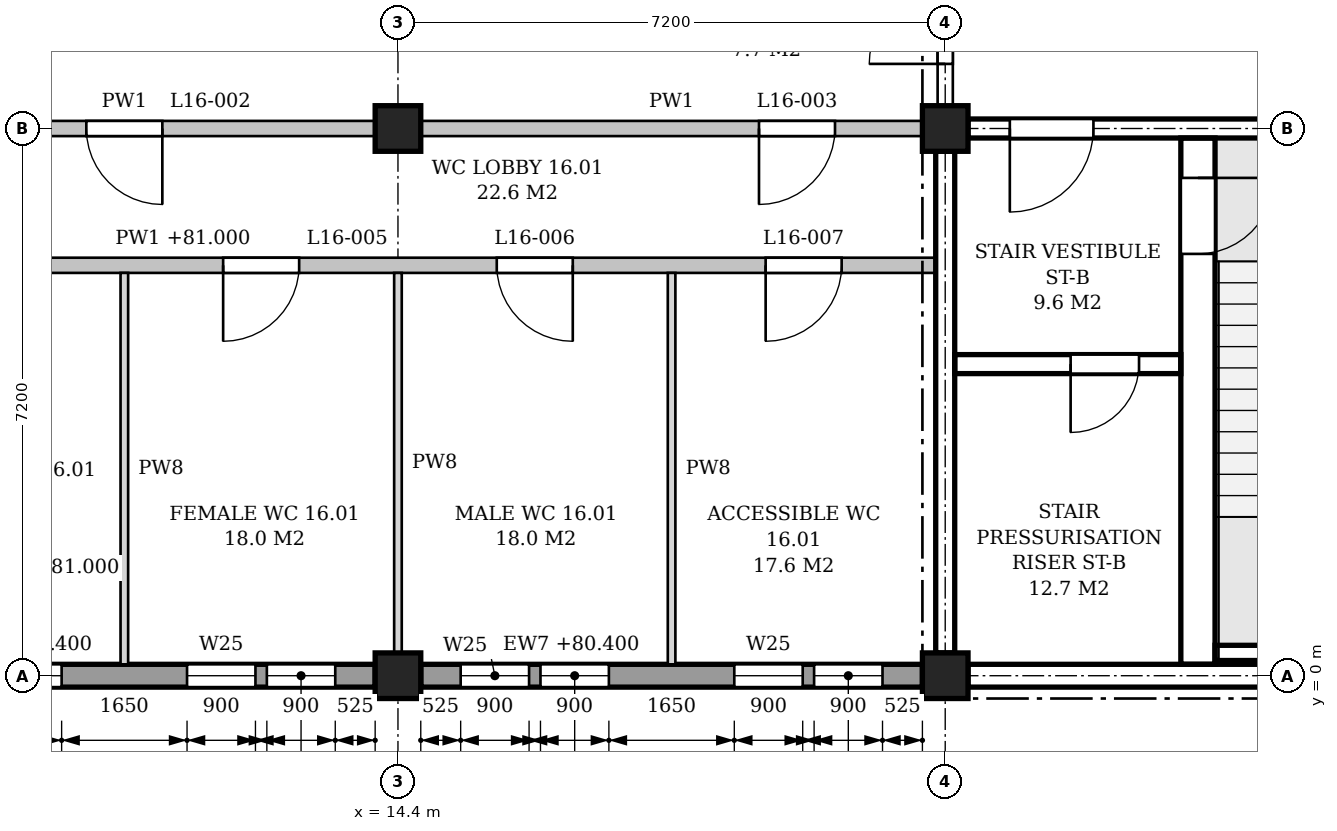
"""IFC4 building model, lengths in metres.
Left out: names, types, materials, properties, quantities, classifications, styles, units other than length and angle.
Written with IfcOpenShell. Run it as: python <this file> out.ifc"""

import sys

from ifc_helpers import new_model, si_unit, direction, frame, frame_2d, origin, origin_2d, place, context, subcontext, project, spatial, polyline, rectangle, outline, extrude, element, fill, save


model = new_model("IFC4")
c1 = context("Model", 3, precision=1e-05, world=origin(), true_north=direction((0.0, 1.0)))
c2 = subcontext(c1, "Body", "Model", "MODEL_VIEW")
j1 = project(units=[si_unit("LENGTHUNIT", "METRE"), si_unit("PLANEANGLEUNIT", "RADIAN")], contexts=[c1])
p1 = place(None, origin())
s1 = spatial("IfcSite", under=j1, at=p1, CompositionType="ELEMENT")
p2 = place(p1, origin())
s2 = spatial("IfcBuilding", under=s1, at=p2, CompositionType="ELEMENT")
p3 = place(p2, frame((0.0, 0.0, 76.8)))
s3 = spatial("IfcBuildingStorey", under=s2, at=p3, CompositionType="ELEMENT", Elevation=76.8)
for number, where, z_axis, x_axis in (
    (1, (14.4, 0.0, 0.0), (0.0, 0.0, 1.0), (1.0, 0.0, 0.0)),
    (2, (14.4, 7.2, 0.0), (0.0, 0.0, 1.0), (1.0, 0.0, 0.0)),
    (3, (21.6, 0.0, 0.0), (0.0, 0.0, 1.0), (1.0, 0.0, 0.0)),
    (4, (21.6, 7.2, 0.0), (0.0, 0.0, 1.0), (1.0, 0.0, 0.0)),
):
    element("IfcColumn", number, at=place(p3, frame(where, z_axis=z_axis, x_axis=x_axis)), inside=s3, PredefinedType="COLUMN", context=c2, shape_type="SweptSolid", body=[
        extrude(rectangle(XDim=0.6, YDim=0.6, at=origin_2d()), origin(), (0.0, 0.0, 1.0), 4.5),
    ])
p4 = place(p3, frame((7.5, 0.0, 0.0), z_axis=(0.0, 0.0, 1.0), x_axis=(1.0, 0.0, 0.0)))
e5 = element("IfcWall", 5, at=p4, inside=s3, PredefinedType="STANDARD", context=c2, shape_type="SweptSolid", body=[
    extrude(rectangle(XDim=6.6, YDim=0.3, at=frame_2d((3.3, 0.0))), origin(), (0.0, 0.0, 1.0), 3.6),
])
p5 = place(p4, frame((0.525, 0.0, 0.9)))
e6 = element("IfcOpeningElement", 6, at=p5, cuts=e5, PredefinedType="OPENING", context=c2, shape_type="SweptSolid", body=[
    extrude(outline(polyline([(0.0, 0.0), (0.9, 0.0), (0.9, 2.15), (0.45, 2.6), (0.0, 2.15), (0.0, 0.0)])), frame((0.0, 0.16, 0.0), z_axis=(0.0, -1.0, 0.0), x_axis=(1.0, 0.0, 0.0)), (0.0, 0.0, 1.0), 0.32),
])
p6 = place(p4, frame((1.575, 0.0, 0.9)))
e7 = element("IfcOpeningElement", 7, at=p6, cuts=e5, PredefinedType="OPENING", context=c2, shape_type="SweptSolid", body=[
    extrude(outline(polyline([(0.0, 0.0), (0.9, 0.0), (0.9, 2.15), (0.45, 2.6), (0.0, 2.15), (0.0, 0.0)])), frame((0.0, 0.16, 0.0), z_axis=(0.0, -1.0, 0.0), x_axis=(1.0, 0.0, 0.0)), (0.0, 0.0, 1.0), 0.32),
])
p7 = place(p4, frame((4.125, 0.0, 0.9)))
e8 = element("IfcOpeningElement", 8, at=p7, cuts=e5, PredefinedType="OPENING", context=c2, shape_type="SweptSolid", body=[
    extrude(outline(polyline([(0.0, 0.0), (0.9, 0.0), (0.9, 2.15), (0.45, 2.6), (0.0, 2.15), (0.0, 0.0)])), frame((0.0, 0.16, 0.0), z_axis=(0.0, -1.0, 0.0), x_axis=(1.0, 0.0, 0.0)), (0.0, 0.0, 1.0), 0.32),
])
p8 = place(p4, frame((5.175, 0.0, 0.9)))
e9 = element("IfcOpeningElement", 9, at=p8, cuts=e5, PredefinedType="OPENING", context=c2, shape_type="SweptSolid", body=[
    extrude(outline(polyline([(0.0, 0.0), (0.9, 0.0), (0.9, 2.15), (0.45, 2.6), (0.0, 2.15), (0.0, 0.0)])), frame((0.0, 0.16, 0.0), z_axis=(0.0, -1.0, 0.0), x_axis=(1.0, 0.0, 0.0)), (0.0, 0.0, 1.0), 0.32),
])
p9 = place(p3, frame((14.7, 0.0, 0.0), z_axis=(0.0, 0.0, 1.0), x_axis=(1.0, 0.0, 0.0)))
e10 = element("IfcWall", 10, at=p9, inside=s3, PredefinedType="STANDARD", context=c2, shape_type="SweptSolid", body=[
    extrude(rectangle(XDim=6.6, YDim=0.3, at=frame_2d((3.3, 0.0))), origin(), (0.0, 0.0, 1.0), 3.6),
])
p10 = place(p9, frame((0.525, 0.0, 0.9)))
e11 = element("IfcOpeningElement", 11, at=p10, cuts=e10, PredefinedType="OPENING", context=c2, shape_type="SweptSolid", body=[
    extrude(outline(polyline([(0.0, 0.0), (0.9, 0.0), (0.9, 2.15), (0.45, 2.6), (0.0, 2.15), (0.0, 0.0)])), frame((0.0, 0.16, 0.0), z_axis=(0.0, -1.0, 0.0), x_axis=(1.0, 0.0, 0.0)), (0.0, 0.0, 1.0), 0.32),
])
p11 = place(p9, frame((1.575, 0.0, 0.9)))
e12 = element("IfcOpeningElement", 12, at=p11, cuts=e10, PredefinedType="OPENING", context=c2, shape_type="SweptSolid", body=[
    extrude(outline(polyline([(0.0, 0.0), (0.9, 0.0), (0.9, 2.15), (0.45, 2.6), (0.0, 2.15), (0.0, 0.0)])), frame((0.0, 0.16, 0.0), z_axis=(0.0, -1.0, 0.0), x_axis=(1.0, 0.0, 0.0)), (0.0, 0.0, 1.0), 0.32),
])
p12 = place(p9, frame((4.125, 0.0, 0.9)))
e13 = element("IfcOpeningElement", 13, at=p12, cuts=e10, PredefinedType="OPENING", context=c2, shape_type="SweptSolid", body=[
    extrude(outline(polyline([(0.0, 0.0), (0.9, 0.0), (0.9, 2.15), (0.45, 2.6), (0.0, 2.15), (0.0, 0.0)])), frame((0.0, 0.16, 0.0), z_axis=(0.0, -1.0, 0.0), x_axis=(1.0, 0.0, 0.0)), (0.0, 0.0, 1.0), 0.32),
])
p13 = place(p9, frame((5.175, 0.0, 0.9)))
e14 = element("IfcOpeningElement", 14, at=p13, cuts=e10, PredefinedType="OPENING", context=c2, shape_type="SweptSolid", body=[
    extrude(outline(polyline([(0.0, 0.0), (0.9, 0.0), (0.9, 2.15), (0.45, 2.6), (0.0, 2.15), (0.0, 0.0)])), frame((0.0, 0.16, 0.0), z_axis=(0.0, -1.0, 0.0), x_axis=(1.0, 0.0, 0.0)), (0.0, 0.0, 1.0), 0.32),
])
p14 = place(p3, frame((21.9, 0.0, 0.0), z_axis=(0.0, 0.0, 1.0), x_axis=(1.0, 0.0, 0.0)))
e15 = element("IfcWall", 15, at=p14, inside=s3, PredefinedType="STANDARD", context=c2, shape_type="SweptSolid", body=[
    extrude(rectangle(XDim=6.6, YDim=0.3, at=frame_2d((3.3, 0.0))), origin(), (0.0, 0.0, 1.0), 3.6),
])
p15 = place(p14, frame((4.65, 0.0, 0.9)))
e16 = element("IfcOpeningElement", 16, at=p15, cuts=e15, PredefinedType="OPENING", context=c2, shape_type="SweptSolid", body=[
    extrude(outline(polyline([(0.0, 0.0), (0.9, 0.0), (0.9, 2.15), (0.45, 2.6), (0.0, 2.15), (0.0, 0.0)])), frame((0.0, 0.16, 0.0), z_axis=(0.0, -1.0, 0.0), x_axis=(1.0, 0.0, 0.0)), (0.0, 0.0, 1.0), 0.32),
])
p16 = place(p3, frame((21.9, 7.2, 0.0), z_axis=(0.0, 0.0, 1.0), x_axis=(1.0, 0.0, 0.0)))
e17 = element("IfcWall", 17, at=p16, inside=s3, PredefinedType="SHEAR", context=c2, shape_type="SweptSolid", body=[
    extrude(rectangle(XDim=6.6, YDim=0.25, at=frame_2d((3.3, 0.0))), origin(), (0.0, 0.0, 1.0), 3.55),
])
p17 = place(p16, frame((0.55, 0.0, 0.0)))
e18 = element("IfcOpeningElement", 18, at=p17, cuts=e17, PredefinedType="OPENING", context=c2, shape_type="SweptSolid", body=[
    extrude(rectangle(XDim=1.1, YDim=2.1, at=frame_2d((0.55, 1.05))), frame((0.0, 0.135, 0.0), z_axis=(0.0, -1.0, 0.0), x_axis=(1.0, 0.0, 0.0)), (0.0, 0.0, 1.0), 0.27),
])
p18 = place(p3, frame((21.6, 0.3, 0.0), z_axis=(0.0, 0.0, 1.0), x_axis=(0.0, 1.0, 0.0)))
e19 = element("IfcWall", 19, at=p18, inside=s3, PredefinedType="SHEAR", context=c2, shape_type="SweptSolid", body=[
    extrude(rectangle(XDim=6.6, YDim=0.25, at=frame_2d((3.3, 0.0))), origin(), (0.0, 0.0, 1.0), 3.55),
])
p19 = place(p3, frame((25.15, 0.3, -0.25), z_axis=(0.0, 0.0, 1.0), x_axis=(1.0, 0.0, 0.0)))
e20 = element("IfcWall", 20, at=p19, inside=s3, PredefinedType="SHEAR", context=c2, shape_type="SweptSolid", body=[
    extrude(rectangle(XDim=1.4, YDim=0.2, at=frame_2d((0.7, 0.0))), origin(), (0.0, 0.0, 1.0), 4.45),
])
p20 = place(p3, frame((24.925, 0.15, 0.0), z_axis=(0.0, 0.0, 1.0), x_axis=(0.0, 1.0, 0.0)))
e21 = element("IfcWall", 21, at=p20, inside=s3, PredefinedType="SHEAR", context=c2, shape_type="SweptSolid", body=[
    extrude(rectangle(XDim=6.925, YDim=0.45, at=frame_2d((3.462, 0.0))), origin(), (0.0, 0.0, 1.0), 4.2),
])
p21 = place(p20, frame((5.4, 0.0, 0.0)))
e22 = element("IfcOpeningElement", 22, at=p21, cuts=e21, PredefinedType="OPENING", context=c2, shape_type="SweptSolid", body=[
    extrude(rectangle(XDim=1.0, YDim=2.1, at=frame_2d((0.5, 1.05))), frame((0.0, 0.235, 0.0), z_axis=(0.0, -1.0, 0.0), x_axis=(1.0, 0.0, 0.0)), (0.0, 0.0, 1.0), 0.47),
])
p22 = place(p3, frame((21.725, 4.1, 0.0), z_axis=(0.0, 0.0, 1.0), x_axis=(1.0, 0.0, 0.0)))
e23 = element("IfcWall", 23, at=p22, inside=s3, PredefinedType="SHEAR", context=c2, shape_type="SweptSolid", body=[
    extrude(rectangle(XDim=2.975, YDim=0.25, at=frame_2d((1.487, 0.0))), origin(), (0.0, 0.0, 1.0), 4.2),
])
p23 = place(p22, frame((1.525, 0.0, 0.0)))
e24 = element("IfcOpeningElement", 24, at=p23, cuts=e23, PredefinedType="OPENING", context=c2, shape_type="SweptSolid", body=[
    extrude(rectangle(XDim=0.9, YDim=2.1, at=frame_2d((0.45, 1.05))), frame((0.0, 0.135, 0.0), z_axis=(0.0, -1.0, 0.0), x_axis=(1.0, 0.0, 0.0)), (0.0, 0.0, 1.0), 0.27),
])
p24 = place(p3, frame((7.325, 5.4, 0.0), z_axis=(0.0, 0.0, 1.0), x_axis=(1.0, 0.0, 0.0)))
e25 = element("IfcWall", 25, at=p24, inside=s3, PredefinedType="PARTITIONING", context=c2, shape_type="SweptSolid", body=[
    extrude(outline(polyline([(0.0, 0.0), (14.15, 0.0), (14.15, 3.55), (14.05, 3.55), (14.05, 4.2), (7.3, 4.2), (7.3, 3.55), (6.85, 3.55), (6.85, 4.2), (0.1, 4.2), (0.1, 3.55), (0.0, 3.55), (0.0, 0.0)])), frame((0.0, 0.1, 0.0), z_axis=(0.0, -1.0, 0.0), x_axis=(1.0, 0.0, 0.0)), (0.0, 0.0, 1.0), 0.2),
])
p25 = place(p24, frame((1.238, 0.0, 0.0)))
e26 = element("IfcOpeningElement", 26, at=p25, cuts=e25, PredefinedType="OPENING", context=c2, shape_type="SweptSolid", body=[
    extrude(rectangle(XDim=1.0, YDim=2.1, at=frame_2d((0.5, 1.05))), frame((0.0, 0.11, 0.0), z_axis=(0.0, -1.0, 0.0), x_axis=(1.0, 0.0, 0.0)), (0.0, 0.0, 1.0), 0.22),
])
p26 = place(p24, frame((4.775, 0.0, 0.0)))
e27 = element("IfcOpeningElement", 27, at=p26, cuts=e25, PredefinedType="OPENING", context=c2, shape_type="SweptSolid", body=[
    extrude(rectangle(XDim=1.0, YDim=2.1, at=frame_2d((0.5, 1.05))), frame((0.0, 0.11, 0.0), z_axis=(0.0, -1.0, 0.0), x_axis=(1.0, 0.0, 0.0)), (0.0, 0.0, 1.0), 0.22),
])
p27 = place(p24, frame((8.375, 0.0, 0.0)))
e28 = element("IfcOpeningElement", 28, at=p27, cuts=e25, PredefinedType="OPENING", context=c2, shape_type="SweptSolid", body=[
    extrude(rectangle(XDim=1.0, YDim=2.1, at=frame_2d((0.5, 1.05))), frame((0.0, 0.11, 0.0), z_axis=(0.0, -1.0, 0.0), x_axis=(1.0, 0.0, 0.0)), (0.0, 0.0, 1.0), 0.22),
])
p28 = place(p24, frame((11.913, 0.0, 0.0)))
e29 = element("IfcOpeningElement", 29, at=p28, cuts=e25, PredefinedType="OPENING", context=c2, shape_type="SweptSolid", body=[
    extrude(rectangle(XDim=1.0, YDim=2.1, at=frame_2d((0.5, 1.05))), frame((0.0, 0.11, 0.0), z_axis=(0.0, -1.0, 0.0), x_axis=(1.0, 0.0, 0.0)), (0.0, 0.0, 1.0), 0.22),
])
p29 = place(p3, frame((7.5, 7.2, 0.0), z_axis=(0.0, 0.0, 1.0), x_axis=(1.0, 0.0, 0.0)))
e30 = element("IfcWall", 30, at=p29, inside=s3, PredefinedType="PARTITIONING", context=c2, shape_type="SweptSolid", body=[
    extrude(rectangle(XDim=6.6, YDim=0.2, at=frame_2d((3.3, 0.0))), origin(), (0.0, 0.0, 1.0), 3.55),
])
p30 = place(p29, frame((2.8, 0.0, 0.0)))
e31 = element("IfcOpeningElement", 31, at=p30, cuts=e30, PredefinedType="OPENING", context=c2, shape_type="SweptSolid", body=[
    extrude(rectangle(XDim=1.0, YDim=2.1, at=frame_2d((0.5, 1.05))), frame((0.0, 0.11, 0.0), z_axis=(0.0, -1.0, 0.0), x_axis=(1.0, 0.0, 0.0)), (0.0, 0.0, 1.0), 0.22),
])
p31 = place(p3, frame((14.7, 7.2, 0.0), z_axis=(0.0, 0.0, 1.0), x_axis=(1.0, 0.0, 0.0)))
e32 = element("IfcWall", 32, at=p31, inside=s3, PredefinedType="PARTITIONING", context=c2, shape_type="SweptSolid", body=[
    extrude(rectangle(XDim=6.6, YDim=0.2, at=frame_2d((3.3, 0.0))), origin(), (0.0, 0.0, 1.0), 3.55),
])
p32 = place(p31, frame((4.45, 0.0, 0.0)))
e33 = element("IfcOpeningElement", 33, at=p32, cuts=e32, PredefinedType="OPENING", context=c2, shape_type="SweptSolid", body=[
    extrude(rectangle(XDim=1.0, YDim=2.1, at=frame_2d((0.5, 1.05))), frame((0.0, 0.11, 0.0), z_axis=(0.0, -1.0, 0.0), x_axis=(1.0, 0.0, 0.0)), (0.0, 0.0, 1.0), 0.22),
])
p33 = place(p3, frame((10.8, 0.15, 0.0), z_axis=(0.0, 0.0, 1.0), x_axis=(0.0, 1.0, 0.0)))
e34 = element("IfcWall", 34, at=p33, inside=s3, PredefinedType="PARTITIONING", context=c2, shape_type="SweptSolid", body=[
    extrude(rectangle(XDim=5.15, YDim=0.1, at=frame_2d((2.575, 0.0))), origin(), (0.0, 0.0, 1.0), 3.55),
])
p34 = place(p3, frame((14.4, 0.3, 0.0), z_axis=(0.0, 0.0, 1.0), x_axis=(0.0, 1.0, 0.0)))
e35 = element("IfcWall", 35, at=p34, inside=s3, PredefinedType="PARTITIONING", context=c2, shape_type="SweptSolid", body=[
    extrude(rectangle(XDim=5.0, YDim=0.1, at=frame_2d((2.5, 0.0))), origin(), (0.0, 0.0, 1.0), 3.55),
])
p35 = place(p3, frame((18.0, 0.15, 0.0), z_axis=(0.0, 0.0, 1.0), x_axis=(0.0, 1.0, 0.0)))
e36 = element("IfcWall", 36, at=p35, inside=s3, PredefinedType="PARTITIONING", context=c2, shape_type="SweptSolid", body=[
    extrude(rectangle(XDim=5.15, YDim=0.1, at=frame_2d((2.575, 0.0))), origin(), (0.0, 0.0, 1.0), 3.55),
])
p36 = place(p3, frame((21.6, 7.5, 0.0), z_axis=(0.0, 0.0, 1.0), x_axis=(0.0, 1.0, 0.0)))
e37 = element("IfcWall", 37, at=p36, inside=s3, PredefinedType="PARTITIONING", context=c2, shape_type="SweptSolid", body=[
    extrude(rectangle(XDim=2.825, YDim=0.2, at=frame_2d((1.413, 0.0))), origin(), (0.0, 0.0, 1.0), 3.55),
])
p37 = place(p36, frame((0.55, 0.0, 0.0)))
e38 = element("IfcOpeningElement", 38, at=p37, cuts=e37, PredefinedType="OPENING", context=c2, shape_type="SweptSolid", body=[
    extrude(rectangle(XDim=1.0, YDim=2.1, at=frame_2d((0.5, 1.05))), frame((0.0, 0.11, 0.0), z_axis=(0.0, -1.0, 0.0), x_axis=(1.0, 0.0, 0.0)), (0.0, 0.0, 1.0), 0.22),
])
p38 = place(p6, origin())
e39 = element("IfcWindow", 39, at=p38, inside=s3, PartitioningType="SINGLE_PANEL", PredefinedType="WINDOW", context=c2, shape_type="SweptSolid", body=[
    extrude(outline(polyline([(0.0, 0.0), (0.9, 0.0), (0.9, 2.15), (0.45, 2.6), (0.0, 2.15), (0.0, 0.0)])), frame((0.0, 0.03, 0.0), z_axis=(0.0, -1.0, 0.0), x_axis=(1.0, 0.0, 0.0)), (0.0, 0.0, 1.0), 0.06),
])
fill(e7, e39)
p39 = place(p7, origin())
e40 = element("IfcWindow", 40, at=p39, inside=s3, PartitioningType="SINGLE_PANEL", PredefinedType="WINDOW", context=c2, shape_type="SweptSolid", body=[
    extrude(outline(polyline([(0.0, 0.0), (0.9, 0.0), (0.9, 2.15), (0.45, 2.6), (0.0, 2.15), (0.0, 0.0)])), frame((0.0, 0.03, 0.0), z_axis=(0.0, -1.0, 0.0), x_axis=(1.0, 0.0, 0.0)), (0.0, 0.0, 1.0), 0.06),
])
fill(e8, e40)
p40 = place(p8, origin())
e41 = element("IfcWindow", 41, at=p40, inside=s3, PartitioningType="SINGLE_PANEL", PredefinedType="WINDOW", context=c2, shape_type="SweptSolid", body=[
    extrude(outline(polyline([(0.0, 0.0), (0.9, 0.0), (0.9, 2.15), (0.45, 2.6), (0.0, 2.15), (0.0, 0.0)])), frame((0.0, 0.03, 0.0), z_axis=(0.0, -1.0, 0.0), x_axis=(1.0, 0.0, 0.0)), (0.0, 0.0, 1.0), 0.06),
])
fill(e9, e41)
p41 = place(p10, origin())
e42 = element("IfcWindow", 42, at=p41, inside=s3, PartitioningType="SINGLE_PANEL", PredefinedType="WINDOW", context=c2, shape_type="SweptSolid", body=[
    extrude(outline(polyline([(0.0, 0.0), (0.9, 0.0), (0.9, 2.15), (0.45, 2.6), (0.0, 2.15), (0.0, 0.0)])), frame((0.0, 0.03, 0.0), z_axis=(0.0, -1.0, 0.0), x_axis=(1.0, 0.0, 0.0)), (0.0, 0.0, 1.0), 0.06),
])
fill(e11, e42)
p42 = place(p11, origin())
e43 = element("IfcWindow", 43, at=p42, inside=s3, PartitioningType="SINGLE_PANEL", PredefinedType="WINDOW", context=c2, shape_type="SweptSolid", body=[
    extrude(outline(polyline([(0.0, 0.0), (0.9, 0.0), (0.9, 2.15), (0.45, 2.6), (0.0, 2.15), (0.0, 0.0)])), frame((0.0, 0.03, 0.0), z_axis=(0.0, -1.0, 0.0), x_axis=(1.0, 0.0, 0.0)), (0.0, 0.0, 1.0), 0.06),
])
fill(e12, e43)
p43 = place(p12, origin())
e44 = element("IfcWindow", 44, at=p43, inside=s3, PartitioningType="SINGLE_PANEL", PredefinedType="WINDOW", context=c2, shape_type="SweptSolid", body=[
    extrude(outline(polyline([(0.0, 0.0), (0.9, 0.0), (0.9, 2.15), (0.45, 2.6), (0.0, 2.15), (0.0, 0.0)])), frame((0.0, 0.03, 0.0), z_axis=(0.0, -1.0, 0.0), x_axis=(1.0, 0.0, 0.0)), (0.0, 0.0, 1.0), 0.06),
])
fill(e13, e44)
p44 = place(p13, origin())
e45 = element("IfcWindow", 45, at=p44, inside=s3, PartitioningType="SINGLE_PANEL", PredefinedType="WINDOW", context=c2, shape_type="SweptSolid", body=[
    extrude(outline(polyline([(0.0, 0.0), (0.9, 0.0), (0.9, 2.15), (0.45, 2.6), (0.0, 2.15), (0.0, 0.0)])), frame((0.0, 0.03, 0.0), z_axis=(0.0, -1.0, 0.0), x_axis=(1.0, 0.0, 0.0)), (0.0, 0.0, 1.0), 0.06),
])
fill(e14, e45)
p45 = place(p21, frame((1.0, 0.0, 0.0), z_axis=(0.0, 0.0, 1.0), x_axis=(-1.0, 0.0, 0.0)))
e46 = element("IfcDoor", 46, at=p45, inside=s3, OperationType="SINGLE_SWING_LEFT", PredefinedType="DOOR", context=c2, shape_type="SweptSolid", body=[
    extrude(rectangle(XDim=1.0, YDim=2.1, at=frame_2d((0.5, 1.05))), frame((0.0, 0.025, 0.0), z_axis=(0.0, -1.0, 0.0), x_axis=(1.0, 0.0, 0.0)), (0.0, 0.0, 1.0), 0.05),
])
fill(e22, e46)
p46 = place(p17, frame((1.1, 0.0, 0.0), z_axis=(0.0, 0.0, 1.0), x_axis=(-1.0, 0.0, 0.0)))
e47 = element("IfcDoor", 47, at=p46, inside=s3, OperationType="SINGLE_SWING_RIGHT", PredefinedType="DOOR", context=c2, shape_type="SweptSolid", body=[
    extrude(rectangle(XDim=1.1, YDim=2.1, at=frame_2d((0.55, 1.05))), frame((0.0, 0.025, 0.0), z_axis=(0.0, -1.0, 0.0), x_axis=(1.0, 0.0, 0.0)), (0.0, 0.0, 1.0), 0.05),
])
fill(e18, e47)
p47 = place(p23, frame((0.9, 0.0, 0.0), z_axis=(0.0, 0.0, 1.0), x_axis=(-1.0, 0.0, 0.0)))
e48 = element("IfcDoor", 48, at=p47, inside=s3, OperationType="SINGLE_SWING_RIGHT", PredefinedType="DOOR", context=c2, shape_type="SweptSolid", body=[
    extrude(rectangle(XDim=0.9, YDim=2.1, at=frame_2d((0.45, 1.05))), frame((0.0, 0.025, 0.0), z_axis=(0.0, -1.0, 0.0), x_axis=(1.0, 0.0, 0.0)), (0.0, 0.0, 1.0), 0.05),
])
fill(e24, e48)
p48 = place(p37, origin())
e49 = element("IfcDoor", 49, at=p48, inside=s3, OperationType="SINGLE_SWING_LEFT", PredefinedType="DOOR", context=c2, shape_type="SweptSolid", body=[
    extrude(rectangle(XDim=1.0, YDim=2.1, at=frame_2d((0.5, 1.05))), frame((0.0, 0.025, 0.0), z_axis=(0.0, -1.0, 0.0), x_axis=(1.0, 0.0, 0.0)), (0.0, 0.0, 1.0), 0.05),
])
fill(e38, e49)
p49 = place(p30, frame((1.0, 0.0, 0.0), z_axis=(0.0, 0.0, 1.0), x_axis=(-1.0, 0.0, 0.0)))
e50 = element("IfcDoor", 50, at=p49, inside=s3, OperationType="SINGLE_SWING_LEFT", PredefinedType="DOOR", context=c2, shape_type="SweptSolid", body=[
    extrude(rectangle(XDim=1.0, YDim=2.1, at=frame_2d((0.5, 1.05))), frame((0.0, 0.025, 0.0), z_axis=(0.0, -1.0, 0.0), x_axis=(1.0, 0.0, 0.0)), (0.0, 0.0, 1.0), 0.05),
])
fill(e31, e50)
p50 = place(p32, frame((1.0, 0.0, 0.0), z_axis=(0.0, 0.0, 1.0), x_axis=(-1.0, 0.0, 0.0)))
e51 = element("IfcDoor", 51, at=p50, inside=s3, OperationType="SINGLE_SWING_RIGHT", PredefinedType="DOOR", context=c2, shape_type="SweptSolid", body=[
    extrude(rectangle(XDim=1.0, YDim=2.1, at=frame_2d((0.5, 1.05))), frame((0.0, 0.025, 0.0), z_axis=(0.0, -1.0, 0.0), x_axis=(1.0, 0.0, 0.0)), (0.0, 0.0, 1.0), 0.05),
])
fill(e33, e51)
p51 = place(p26, frame((1.0, 0.0, 0.0), z_axis=(0.0, 0.0, 1.0), x_axis=(-1.0, 0.0, 0.0)))
e52 = element("IfcDoor", 52, at=p51, inside=s3, OperationType="SINGLE_SWING_RIGHT", PredefinedType="DOOR", context=c2, shape_type="SweptSolid", body=[
    extrude(rectangle(XDim=1.0, YDim=2.1, at=frame_2d((0.5, 1.05))), frame((0.0, 0.025, 0.0), z_axis=(0.0, -1.0, 0.0), x_axis=(1.0, 0.0, 0.0)), (0.0, 0.0, 1.0), 0.05),
])
fill(e27, e52)
p52 = place(p27, frame((1.0, 0.0, 0.0), z_axis=(0.0, 0.0, 1.0), x_axis=(-1.0, 0.0, 0.0)))
e53 = element("IfcDoor", 53, at=p52, inside=s3, OperationType="SINGLE_SWING_LEFT", PredefinedType="DOOR", context=c2, shape_type="SweptSolid", body=[
    extrude(rectangle(XDim=1.0, YDim=2.1, at=frame_2d((0.5, 1.05))), frame((0.0, 0.025, 0.0), z_axis=(0.0, -1.0, 0.0), x_axis=(1.0, 0.0, 0.0)), (0.0, 0.0, 1.0), 0.05),
])
fill(e28, e53)
p53 = place(p28, frame((1.0, 0.0, 0.0), z_axis=(0.0, 0.0, 1.0), x_axis=(-1.0, 0.0, 0.0)))
e54 = element("IfcDoor", 54, at=p53, inside=s3, OperationType="SINGLE_SWING_RIGHT", PredefinedType="DOOR", context=c2, shape_type="SweptSolid", body=[
    extrude(rectangle(XDim=1.0, YDim=2.1, at=frame_2d((0.5, 1.05))), frame((0.0, 0.025, 0.0), z_axis=(0.0, -1.0, 0.0), x_axis=(1.0, 0.0, 0.0)), (0.0, 0.0, 1.0), 0.05),
])
fill(e29, e54)
save(model, sys.argv[1])
